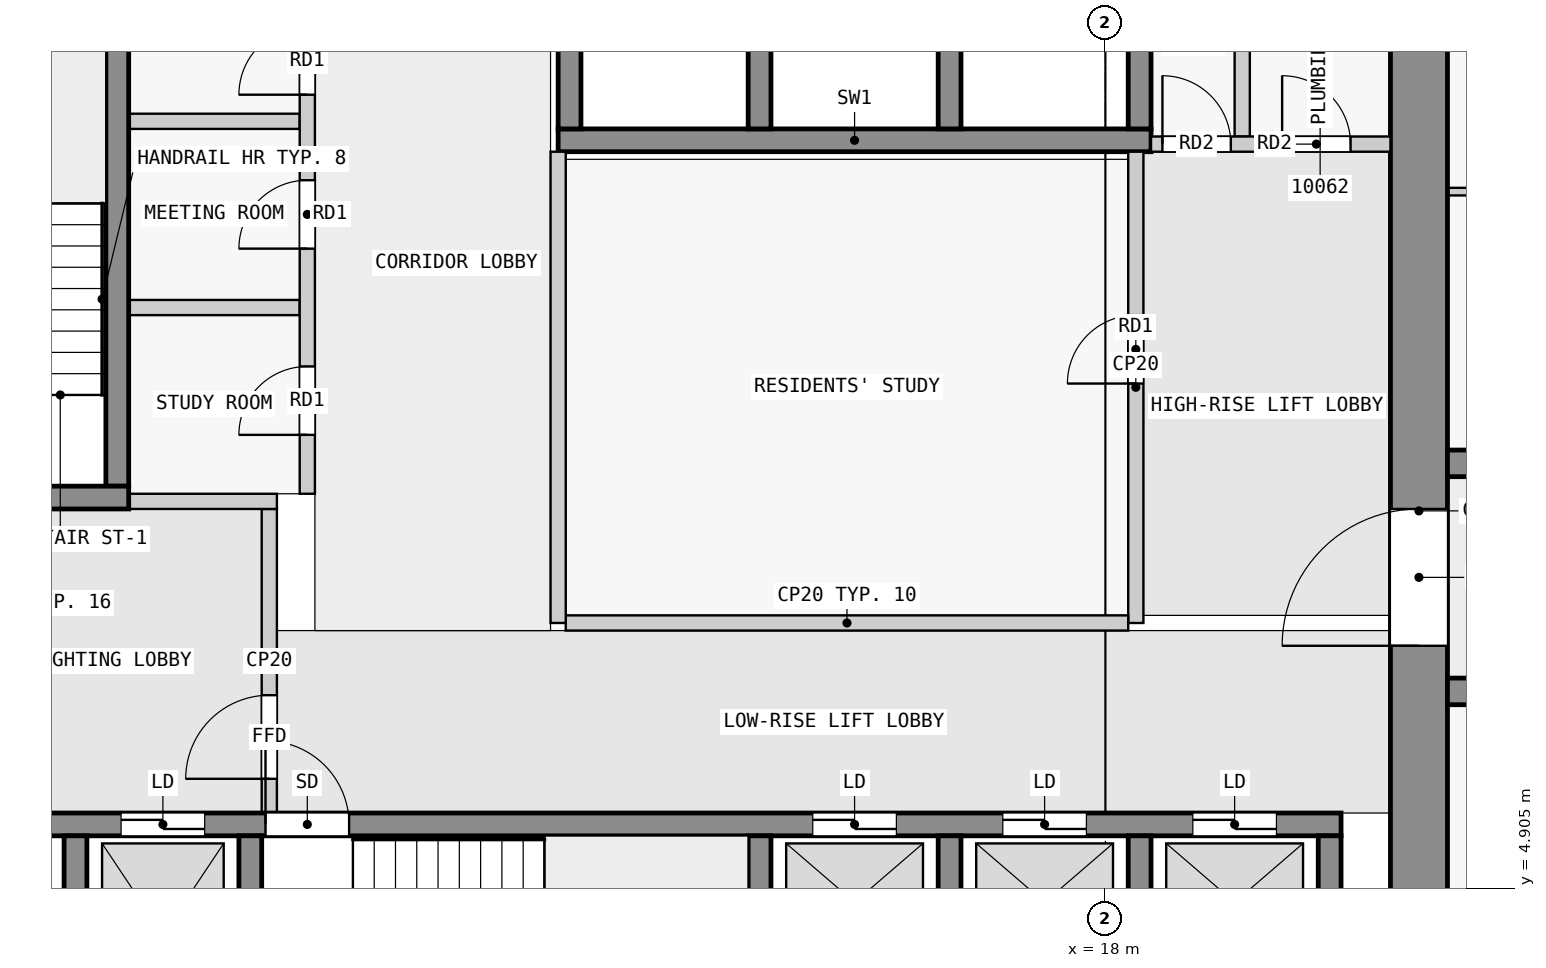
"""IFC4 building model, lengths in metres.
Left out: names, types, materials, properties, quantities, classifications, styles, units other than length and angle.
Written with IfcOpenShell. Run it as: python <this file> out.ifc"""

import sys

from ifc_helpers import new_model, si_unit, direction, frame, frame_2d, origin, place, context, subcontext, project, spatial, rectangle, extrude, element, fill, save


model = new_model("IFC4")
c1 = context("Model", 3, precision=1e-05, world=origin(), true_north=direction((0.0, 1.0)))
c2 = subcontext(c1, "Body", "Model", "MODEL_VIEW")
j1 = project(units=[si_unit("LENGTHUNIT", "METRE"), si_unit("PLANEANGLEUNIT", "RADIAN")], contexts=[c1])
p1 = place(None, origin())
s1 = spatial("IfcSite", under=j1, at=p1, CompositionType="ELEMENT")
p2 = place(p1, origin())
s2 = spatial("IfcBuilding", under=s1, at=p2, CompositionType="ELEMENT")
p3 = place(p2, frame((0.0, 0.0, 44.3)))
s3 = spatial("IfcBuildingStorey", under=s2, at=p3, CompositionType="ELEMENT", Elevation=44.3)
p4 = place(p3, frame((22.125, 2.5, 0.0), z_axis=(0.0, 0.0, 1.0), x_axis=(0.0, 1.0, 0.0)))
e1 = element("IfcWall", 1, at=p4, inside=s3, PredefinedType="SHEAR", context=c2, shape_type="SweptSolid", body=[
    extrude(rectangle(XDim=14.75, YDim=0.75, at=frame_2d((7.375, 0.0))), origin(), (0.0, 0.0, 1.0), 3.25),
])
p5 = place(p4, frame((5.6, 0.0, 0.0)))
e2 = element("IfcOpeningElement", 2, at=p5, cuts=e1, PredefinedType="OPENING", context=c2, shape_type="SweptSolid", body=[
    extrude(rectangle(XDim=1.8, YDim=2.1, at=frame_2d((0.9, 1.05))), frame((0.0, 0.385, 0.0), z_axis=(0.0, -1.0, 0.0), x_axis=(1.0, 0.0, 0.0)), (0.0, 0.0, 1.0), 0.77),
])
for number, where, z_axis, x_axis in (
    (3, (4.45, 2.8, 0.0), (0.0, 0.0, 1.0), (0.0, 1.0, 0.0)),
    (4, (6.75, 2.8, 0.0), (0.0, 0.0, 1.0), (0.0, 1.0, 0.0)),
    (5, (13.45, 2.8, 0.0), (0.0, 0.0, 1.0), (0.0, 1.0, 0.0)),
    (6, (15.95, 2.8, 0.0), (0.0, 0.0, 1.0), (0.0, 1.0, 0.0)),
    (7, (18.45, 2.8, 0.0), (0.0, 0.0, 1.0), (0.0, 1.0, 0.0)),
    (8, (20.95, 2.8, 0.0), (0.0, 0.0, 1.0), (0.0, 1.0, 0.0)),
):
    element("IfcWall", number, at=place(p3, frame(where, z_axis=z_axis, x_axis=x_axis)), inside=s3, PredefinedType="SHEAR", context=c2, shape_type="SweptSolid", body=[
        extrude(rectangle(XDim=2.8, YDim=0.3, at=frame_2d((1.4, 0.0))), origin(), (0.0, 0.0, 1.0), 3.25),
    ])
p6 = place(p3, frame((2.3, 5.75, 0.0), z_axis=(0.0, 0.0, 1.0), x_axis=(1.0, 0.0, 0.0)))
e9 = element("IfcWall", 9, at=p6, inside=s3, PredefinedType="SHEAR", context=c2, shape_type="SweptSolid", body=[
    extrude(rectangle(XDim=18.8, YDim=0.3, at=frame_2d((9.4, 0.0))), origin(), (0.0, 0.0, 1.0), 3.25),
])
p7 = place(p6, frame((4.65, 0.0, 0.0)))
e10 = element("IfcOpeningElement", 10, at=p7, cuts=e9, PredefinedType="OPENING", context=c2, shape_type="SweptSolid", body=[
    extrude(rectangle(XDim=1.1, YDim=2.1, at=frame_2d((0.55, 1.05))), frame((0.0, 0.16, 0.0), z_axis=(0.0, -1.0, 0.0), x_axis=(1.0, 0.0, 0.0)), (0.0, 0.0, 1.0), 0.32),
])
p8 = place(p6, frame((0.45, 0.0, 0.0)))
e11 = element("IfcOpeningElement", 11, at=p8, cuts=e9, PredefinedType="OPENING", context=c2, shape_type="SweptSolid", body=[
    extrude(rectangle(XDim=1.1, YDim=2.1, at=frame_2d((0.55, 1.05))), frame((0.0, 0.16, 0.0), z_axis=(0.0, -1.0, 0.0), x_axis=(1.0, 0.0, 0.0)), (0.0, 0.0, 1.0), 0.32),
])
p9 = place(p6, frame((2.75, 0.0, 0.0)))
e12 = element("IfcOpeningElement", 12, at=p9, cuts=e9, PredefinedType="OPENING", context=c2, shape_type="SweptSolid", body=[
    extrude(rectangle(XDim=1.1, YDim=2.1, at=frame_2d((0.55, 1.05))), frame((0.0, 0.16, 0.0), z_axis=(0.0, -1.0, 0.0), x_axis=(1.0, 0.0, 0.0)), (0.0, 0.0, 1.0), 0.32),
])
p10 = place(p6, frame((11.85, 0.0, 0.0)))
e13 = element("IfcOpeningElement", 13, at=p10, cuts=e9, PredefinedType="OPENING", context=c2, shape_type="SweptSolid", body=[
    extrude(rectangle(XDim=1.1, YDim=2.1, at=frame_2d((0.55, 1.05))), frame((0.0, 0.16, 0.0), z_axis=(0.0, -1.0, 0.0), x_axis=(1.0, 0.0, 0.0)), (0.0, 0.0, 1.0), 0.32),
])
p11 = place(p6, frame((14.35, 0.0, 0.0)))
e14 = element("IfcOpeningElement", 14, at=p11, cuts=e9, PredefinedType="OPENING", context=c2, shape_type="SweptSolid", body=[
    extrude(rectangle(XDim=1.1, YDim=2.1, at=frame_2d((0.55, 1.05))), frame((0.0, 0.16, 0.0), z_axis=(0.0, -1.0, 0.0), x_axis=(1.0, 0.0, 0.0)), (0.0, 0.0, 1.0), 0.32),
])
p12 = place(p6, frame((16.85, 0.0, 0.0)))
e15 = element("IfcOpeningElement", 15, at=p12, cuts=e9, PredefinedType="OPENING", context=c2, shape_type="SweptSolid", body=[
    extrude(rectangle(XDim=1.1, YDim=2.1, at=frame_2d((0.55, 1.05))), frame((0.0, 0.16, 0.0), z_axis=(0.0, -1.0, 0.0), x_axis=(1.0, 0.0, 0.0)), (0.0, 0.0, 1.0), 0.32),
])
p13 = place(p3, frame((2.3, 10.05, 0.0), z_axis=(0.0, 0.0, 1.0), x_axis=(1.0, 0.0, 0.0)))
e16 = element("IfcWall", 16, at=p13, inside=s3, PredefinedType="SHEAR", context=c2, shape_type="SweptSolid", body=[
    extrude(rectangle(XDim=2.85, YDim=0.3, at=frame_2d((1.425, 0.0))), origin(), (0.0, 0.0, 1.0), 3.25),
])
p14 = place(p13, frame((0.25, 0.0, 0.0)))
e17 = element("IfcOpeningElement", 17, at=p14, cuts=e16, PredefinedType="OPENING", context=c2, shape_type="SweptSolid", body=[
    extrude(rectangle(XDim=1.1, YDim=2.1, at=frame_2d((0.55, 1.05))), frame((0.0, 0.16, 0.0), z_axis=(0.0, -1.0, 0.0), x_axis=(1.0, 0.0, 0.0)), (0.0, 0.0, 1.0), 0.32),
])
p15 = place(p3, frame((5.0, 10.2, 0.0), z_axis=(0.0, 0.0, 1.0), x_axis=(0.0, 1.0, 0.0)))
e18 = element("IfcWall", 18, at=p15, inside=s3, PredefinedType="SHEAR", context=c2, shape_type="SweptSolid", body=[
    extrude(rectangle(XDim=6.4, YDim=0.3, at=frame_2d((3.2, 0.0))), origin(), (0.0, 0.0, 1.0), 3.25),
])
p16 = place(p3, frame((10.8, 14.75, 0.0), z_axis=(0.0, 0.0, 1.0), x_axis=(1.0, 0.0, 0.0)))
e19 = element("IfcWall", 19, at=p16, inside=s3, PredefinedType="SHEAR", context=c2, shape_type="SweptSolid", body=[
    extrude(rectangle(XDim=7.8, YDim=0.3, at=frame_2d((3.9, 0.0))), origin(), (0.0, 0.0, 1.0), 3.25),
])
for number, where, z_axis, x_axis in (
    (20, (10.95, 14.9, 0.0), (0.0, 0.0, 1.0), (0.0, 1.0, 0.0)),
    (21, (13.45, 14.9, 0.0), (0.0, 0.0, 1.0), (0.0, 1.0, 0.0)),
    (22, (15.95, 14.9, 0.0), (0.0, 0.0, 1.0), (0.0, 1.0, 0.0)),
    (23, (18.45, 14.9, 0.0), (0.0, 0.0, 1.0), (0.0, 1.0, 0.0)),
):
    element("IfcWall", number, at=place(p3, frame(where, z_axis=z_axis, x_axis=x_axis)), inside=s3, PredefinedType="SHEAR", context=c2, shape_type="SweptSolid", body=[
        extrude(rectangle(XDim=2.0, YDim=0.3, at=frame_2d((1.0, 0.0))), origin(), (0.0, 0.0, 1.0), 3.25),
    ])
p17 = place(p3, frame((22.5, 7.5, 0.0), z_axis=(0.0, 0.0, 1.0), x_axis=(1.0, 0.0, 0.0)))
e24 = element("IfcWall", 24, at=p17, inside=s3, PredefinedType="SHEAR", context=c2, shape_type="SweptSolid", body=[
    extrude(rectangle(XDim=22.5, YDim=0.35, at=frame_2d((11.25, 0.0))), origin(), (0.0, 0.0, 1.0), 3.25),
])
p18 = place(p17, frame((1.75, 0.0, 0.0)))
e25 = element("IfcOpeningElement", 25, at=p18, cuts=e24, PredefinedType="OPENING", context=c2, shape_type="SweptSolid", body=[
    extrude(rectangle(XDim=1.0, YDim=2.1, at=frame_2d((0.5, 1.05))), frame((0.0, 0.185, 0.0), z_axis=(0.0, -1.0, 0.0), x_axis=(1.0, 0.0, 0.0)), (0.0, 0.0, 1.0), 0.37),
])
p19 = place(p17, frame((10.15, 0.0, 0.0)))
e26 = element("IfcOpeningElement", 26, at=p19, cuts=e24, PredefinedType="OPENING", context=c2, shape_type="SweptSolid", body=[
    extrude(rectangle(XDim=1.0, YDim=2.1, at=frame_2d((0.5, 1.05))), frame((0.0, 0.185, 0.0), z_axis=(0.0, -1.0, 0.0), x_axis=(1.0, 0.0, 0.0)), (0.0, 0.0, 1.0), 0.37),
])
p20 = place(p17, frame((18.75, 0.0, 0.0)))
e27 = element("IfcOpeningElement", 27, at=p20, cuts=e24, PredefinedType="OPENING", context=c2, shape_type="SweptSolid", body=[
    extrude(rectangle(XDim=0.9, YDim=2.1, at=frame_2d((0.45, 1.05))), frame((0.0, 0.185, 0.0), z_axis=(0.0, -1.0, 0.0), x_axis=(1.0, 0.0, 0.0)), (0.0, 0.0, 1.0), 0.37),
])
p21 = place(p17, frame((20.95, 0.0, 0.0)))
e28 = element("IfcOpeningElement", 28, at=p21, cuts=e24, PredefinedType="OPENING", context=c2, shape_type="SweptSolid", body=[
    extrude(rectangle(XDim=1.0, YDim=2.1, at=frame_2d((0.5, 1.05))), frame((0.0, 0.185, 0.0), z_axis=(0.0, -1.0, 0.0), x_axis=(1.0, 0.0, 0.0)), (0.0, 0.0, 1.0), 0.37),
])
p22 = place(p3, frame((22.5, 10.5, 0.0), z_axis=(0.0, 0.0, 1.0), x_axis=(1.0, 0.0, 0.0)))
e29 = element("IfcWall", 29, at=p22, inside=s3, PredefinedType="SHEAR", context=c2, shape_type="SweptSolid", body=[
    extrude(rectangle(XDim=22.5, YDim=0.35, at=frame_2d((11.25, 0.0))), origin(), (0.0, 0.0, 1.0), 3.25),
])
p23 = place(p22, frame((1.75, 0.0, 0.0)))
e30 = element("IfcOpeningElement", 30, at=p23, cuts=e29, PredefinedType="OPENING", context=c2, shape_type="SweptSolid", body=[
    extrude(rectangle(XDim=1.0, YDim=2.1, at=frame_2d((0.5, 1.05))), frame((0.0, 0.185, 0.0), z_axis=(0.0, -1.0, 0.0), x_axis=(1.0, 0.0, 0.0)), (0.0, 0.0, 1.0), 0.37),
])
p24 = place(p22, frame((6.25, 0.0, 0.0)))
e31 = element("IfcOpeningElement", 31, at=p24, cuts=e29, PredefinedType="OPENING", context=c2, shape_type="SweptSolid", body=[
    extrude(rectangle(XDim=1.0, YDim=2.1, at=frame_2d((0.5, 1.05))), frame((0.0, 0.185, 0.0), z_axis=(0.0, -1.0, 0.0), x_axis=(1.0, 0.0, 0.0)), (0.0, 0.0, 1.0), 0.37),
])
p25 = place(p22, frame((10.75, 0.0, 0.0)))
e32 = element("IfcOpeningElement", 32, at=p25, cuts=e29, PredefinedType="OPENING", context=c2, shape_type="SweptSolid", body=[
    extrude(rectangle(XDim=1.0, YDim=2.1, at=frame_2d((0.5, 1.05))), frame((0.0, 0.185, 0.0), z_axis=(0.0, -1.0, 0.0), x_axis=(1.0, 0.0, 0.0)), (0.0, 0.0, 1.0), 0.37),
])
p26 = place(p22, frame((16.85, 0.0, 0.0)))
e33 = element("IfcOpeningElement", 33, at=p26, cuts=e29, PredefinedType="OPENING", context=c2, shape_type="SweptSolid", body=[
    extrude(rectangle(XDim=1.0, YDim=2.1, at=frame_2d((0.5, 1.05))), frame((0.0, 0.185, 0.0), z_axis=(0.0, -1.0, 0.0), x_axis=(1.0, 0.0, 0.0)), (0.0, 0.0, 1.0), 0.37),
])
p27 = place(p3, frame((7.0, 5.9, 0.0), z_axis=(0.0, 0.0, 1.0), x_axis=(0.0, 1.0, 0.0)))
e34 = element("IfcWall", 34, at=p27, inside=s3, PredefinedType="PARTITIONING", context=c2, shape_type="SweptSolid", body=[
    extrude(rectangle(XDim=4.0, YDim=0.2, at=frame_2d((2.0, 0.0))), origin(), (0.0, 0.0, 1.0), 3.25),
])
p28 = place(p27, frame((0.45, 0.0, 0.0)))
e35 = element("IfcOpeningElement", 35, at=p28, cuts=e34, PredefinedType="OPENING", context=c2, shape_type="SweptSolid", body=[
    extrude(rectangle(XDim=1.1, YDim=2.1, at=frame_2d((0.55, 1.05))), frame((0.0, 0.11, 0.0), z_axis=(0.0, -1.0, 0.0), x_axis=(1.0, 0.0, 0.0)), (0.0, 0.0, 1.0), 0.22),
])
p29 = place(p3, frame((5.15, 10.0, 0.0), z_axis=(0.0, 0.0, 1.0), x_axis=(1.0, 0.0, 0.0)))
e36 = element("IfcWall", 36, at=p29, inside=s3, PredefinedType="PARTITIONING", context=c2, shape_type="SweptSolid", body=[
    extrude(rectangle(XDim=1.95, YDim=0.2, at=frame_2d((0.975, 0.0))), origin(), (0.0, 0.0, 1.0), 3.25),
])
p30 = place(p3, frame((10.8, 8.4, 0.0), z_axis=(0.0, 0.0, 1.0), x_axis=(0.0, 1.0, 0.0)))
e37 = element("IfcWall", 37, at=p30, inside=s3, PredefinedType="PARTITIONING", context=c2, shape_type="SweptSolid", body=[
    extrude(rectangle(XDim=6.2, YDim=0.2, at=frame_2d((3.1, 0.0))), origin(), (0.0, 0.0, 1.0), 3.25),
])
p31 = place(p3, frame((10.9, 8.4, 0.0), z_axis=(0.0, 0.0, 1.0), x_axis=(1.0, 0.0, 0.0)))
e38 = element("IfcWall", 38, at=p31, inside=s3, PredefinedType="PARTITIONING", context=c2, shape_type="SweptSolid", body=[
    extrude(rectangle(XDim=7.4, YDim=0.2, at=frame_2d((3.7, 0.0))), origin(), (0.0, 0.0, 1.0), 3.25),
])
p32 = place(p3, frame((18.4, 8.4, 0.0), z_axis=(0.0, 0.0, 1.0), x_axis=(0.0, 1.0, 0.0)))
e39 = element("IfcWall", 39, at=p32, inside=s3, PredefinedType="PARTITIONING", context=c2, shape_type="SweptSolid", body=[
    extrude(rectangle(XDim=6.2, YDim=0.2, at=frame_2d((3.1, 0.0))), origin(), (0.0, 0.0, 1.0), 3.25),
])
p33 = place(p32, frame((3.15, 0.0, 0.0)))
e40 = element("IfcOpeningElement", 40, at=p33, cuts=e39, PredefinedType="OPENING", context=c2, shape_type="SweptSolid", body=[
    extrude(rectangle(XDim=0.9, YDim=2.1, at=frame_2d((0.45, 1.05))), frame((0.0, 0.11, 0.0), z_axis=(0.0, -1.0, 0.0), x_axis=(1.0, 0.0, 0.0)), (0.0, 0.0, 1.0), 0.22),
])
p34 = place(p3, frame((7.5, 10.1, 0.0), z_axis=(0.0, 0.0, 1.0), x_axis=(0.0, 1.0, 0.0)))
e41 = element("IfcWall", 41, at=p34, inside=s3, PredefinedType="PARTITIONING", context=c2, shape_type="SweptSolid", body=[
    extrude(rectangle(XDim=7.15, YDim=0.2, at=frame_2d((3.575, 0.0))), origin(), (0.0, 0.0, 1.0), 3.25),
])
p35 = place(p34, frame((0.775, 0.0, 0.0)))
e42 = element("IfcOpeningElement", 42, at=p35, cuts=e41, PredefinedType="OPENING", context=c2, shape_type="SweptSolid", body=[
    extrude(rectangle(XDim=0.9, YDim=2.1, at=frame_2d((0.45, 1.05))), frame((0.0, 0.11, 0.0), z_axis=(0.0, -1.0, 0.0), x_axis=(1.0, 0.0, 0.0)), (0.0, 0.0, 1.0), 0.22),
])
p36 = place(p34, frame((3.225, 0.0, 0.0)))
e43 = element("IfcOpeningElement", 43, at=p36, cuts=e41, PredefinedType="OPENING", context=c2, shape_type="SweptSolid", body=[
    extrude(rectangle(XDim=0.9, YDim=2.1, at=frame_2d((0.45, 1.05))), frame((0.0, 0.11, 0.0), z_axis=(0.0, -1.0, 0.0), x_axis=(1.0, 0.0, 0.0)), (0.0, 0.0, 1.0), 0.22),
])
p37 = place(p34, frame((5.25, 0.0, 0.0)))
e44 = element("IfcOpeningElement", 44, at=p37, cuts=e41, PredefinedType="OPENING", context=c2, shape_type="SweptSolid", body=[
    extrude(rectangle(XDim=0.9, YDim=2.1, at=frame_2d((0.45, 1.05))), frame((0.0, 0.11, 0.0), z_axis=(0.0, -1.0, 0.0), x_axis=(1.0, 0.0, 0.0)), (0.0, 0.0, 1.0), 0.22),
])
for number, where, z_axis, x_axis in (
    (45, (5.15, 12.55, 0.0), (0.0, 0.0, 1.0), (1.0, 0.0, 0.0)),
    (46, (5.15, 15.0, 0.0), (0.0, 0.0, 1.0), (1.0, 0.0, 0.0)),
):
    element("IfcWall", number, at=place(p3, frame(where, z_axis=z_axis, x_axis=x_axis)), inside=s3, PredefinedType="PARTITIONING", context=c2, shape_type="SweptSolid", body=[
        extrude(rectangle(XDim=2.25, YDim=0.2, at=frame_2d((1.125, 0.0))), origin(), (0.0, 0.0, 1.0), 3.25),
    ])
p38 = place(p3, frame((18.6, 14.7, 0.0), z_axis=(0.0, 0.0, 1.0), x_axis=(1.0, 0.0, 0.0)))
e47 = element("IfcWall", 47, at=p38, inside=s3, PredefinedType="PARTITIONING", context=c2, shape_type="SweptSolid", body=[
    extrude(rectangle(XDim=3.15, YDim=0.2, at=frame_2d((1.575, 0.0))), origin(), (0.0, 0.0, 1.0), 3.25),
])
p39 = place(p38, frame((0.15, 0.0, 0.0)))
e48 = element("IfcOpeningElement", 48, at=p39, cuts=e47, PredefinedType="OPENING", context=c2, shape_type="SweptSolid", body=[
    extrude(rectangle(XDim=0.9, YDim=2.1, at=frame_2d((0.45, 1.05))), frame((0.0, 0.11, 0.0), z_axis=(0.0, -1.0, 0.0), x_axis=(1.0, 0.0, 0.0)), (0.0, 0.0, 1.0), 0.22),
])
p40 = place(p38, frame((1.725, 0.0, 0.0)))
e49 = element("IfcOpeningElement", 49, at=p40, cuts=e47, PredefinedType="OPENING", context=c2, shape_type="SweptSolid", body=[
    extrude(rectangle(XDim=0.9, YDim=2.1, at=frame_2d((0.45, 1.05))), frame((0.0, 0.11, 0.0), z_axis=(0.0, -1.0, 0.0), x_axis=(1.0, 0.0, 0.0)), (0.0, 0.0, 1.0), 0.22),
])
p41 = place(p3, frame((19.8, 14.8, 0.0), z_axis=(0.0, 0.0, 1.0), x_axis=(0.0, 1.0, 0.0)))
e50 = element("IfcWall", 50, at=p41, inside=s3, PredefinedType="PARTITIONING", context=c2, shape_type="SweptSolid", body=[
    extrude(rectangle(XDim=2.45, YDim=0.2, at=frame_2d((1.225, 0.0))), origin(), (0.0, 0.0, 1.0), 3.25),
])
p42 = place(p3, frame((23.95, 14.075, 0.0), z_axis=(0.0, 0.0, 1.0), x_axis=(-1.0, 0.0, 0.0)))
e51 = element("IfcWall", 51, at=p42, inside=s3, PredefinedType="PARTITIONING", context=c2, shape_type="SweptSolid", body=[
    extrude(rectangle(XDim=1.45, YDim=0.1, at=frame_2d((0.725, 0.0))), origin(), (0.0, 0.0, 1.0), 3.25),
])
p43 = place(p28, origin())
e52 = element("IfcDoor", 52, at=p43, inside=s3, OperationType="SINGLE_SWING_LEFT", PredefinedType="DOOR", context=c2, shape_type="SweptSolid", body=[
    extrude(rectangle(XDim=1.1, YDim=2.1, at=frame_2d((0.55, 1.05))), frame((0.0, 0.025, 0.0), z_axis=(0.0, -1.0, 0.0), x_axis=(1.0, 0.0, 0.0)), (0.0, 0.0, 1.0), 0.05),
])
fill(e35, e52)
p44 = place(p33, origin())
e53 = element("IfcDoor", 53, at=p44, inside=s3, OperationType="SINGLE_SWING_LEFT", PredefinedType="DOOR", context=c2, shape_type="SweptSolid", body=[
    extrude(rectangle(XDim=0.9, YDim=2.1, at=frame_2d((0.45, 1.05))), frame((0.0, 0.025, 0.0), z_axis=(0.0, -1.0, 0.0), x_axis=(1.0, 0.0, 0.0)), (0.0, 0.0, 1.0), 0.05),
])
fill(e40, e53)
p45 = place(p7, origin())
e54 = element("IfcDoor", 54, at=p45, inside=s3, OperationType="SINGLE_SWING_LEFT", PredefinedType="DOOR", context=c2, shape_type="SweptSolid", body=[
    extrude(rectangle(XDim=1.1, YDim=2.1, at=frame_2d((0.55, 1.05))), frame((0.0, 0.025, 0.0), z_axis=(0.0, -1.0, 0.0), x_axis=(1.0, 0.0, 0.0)), (0.0, 0.0, 1.0), 0.05),
])
fill(e10, e54)
p46 = place(p9, origin())
e55 = element("IfcDoor", 55, at=p46, inside=s3, OperationType="DOUBLE_DOOR_SLIDING", PredefinedType="DOOR", context=c2, shape_type="SweptSolid", body=[
    extrude(rectangle(XDim=1.1, YDim=2.1, at=frame_2d((0.55, 1.05))), frame((0.0, 0.025, 0.0), z_axis=(0.0, -1.0, 0.0), x_axis=(1.0, 0.0, 0.0)), (0.0, 0.0, 1.0), 0.05),
])
fill(e12, e55)
p47 = place(p10, origin())
e56 = element("IfcDoor", 56, at=p47, inside=s3, OperationType="DOUBLE_DOOR_SLIDING", PredefinedType="DOOR", context=c2, shape_type="SweptSolid", body=[
    extrude(rectangle(XDim=1.1, YDim=2.1, at=frame_2d((0.55, 1.05))), frame((0.0, 0.025, 0.0), z_axis=(0.0, -1.0, 0.0), x_axis=(1.0, 0.0, 0.0)), (0.0, 0.0, 1.0), 0.05),
])
fill(e13, e56)
p48 = place(p11, origin())
e57 = element("IfcDoor", 57, at=p48, inside=s3, OperationType="DOUBLE_DOOR_SLIDING", PredefinedType="DOOR", context=c2, shape_type="SweptSolid", body=[
    extrude(rectangle(XDim=1.1, YDim=2.1, at=frame_2d((0.55, 1.05))), frame((0.0, 0.025, 0.0), z_axis=(0.0, -1.0, 0.0), x_axis=(1.0, 0.0, 0.0)), (0.0, 0.0, 1.0), 0.05),
])
fill(e14, e57)
p49 = place(p12, origin())
e58 = element("IfcDoor", 58, at=p49, inside=s3, OperationType="DOUBLE_DOOR_SLIDING", PredefinedType="DOOR", context=c2, shape_type="SweptSolid", body=[
    extrude(rectangle(XDim=1.1, YDim=2.1, at=frame_2d((0.55, 1.05))), frame((0.0, 0.025, 0.0), z_axis=(0.0, -1.0, 0.0), x_axis=(1.0, 0.0, 0.0)), (0.0, 0.0, 1.0), 0.05),
])
fill(e15, e58)
p50 = place(p5, origin())
e59 = element("IfcDoor", 59, at=p50, inside=s3, OperationType="DOUBLE_DOOR_SINGLE_SWING", PredefinedType="DOOR", context=c2, shape_type="SweptSolid", body=[
    extrude(rectangle(XDim=1.8, YDim=2.1, at=frame_2d((0.9, 1.05))), frame((0.0, 0.025, 0.0), z_axis=(0.0, -1.0, 0.0), x_axis=(1.0, 0.0, 0.0)), (0.0, 0.0, 1.0), 0.05),
])
fill(e2, e59)
p51 = place(p35, origin())
e60 = element("IfcDoor", 60, at=p51, inside=s3, OperationType="SINGLE_SWING_RIGHT", PredefinedType="DOOR", context=c2, shape_type="SweptSolid", body=[
    extrude(rectangle(XDim=0.9, YDim=2.1, at=frame_2d((0.45, 1.05))), frame((0.0, 0.025, 0.0), z_axis=(0.0, -1.0, 0.0), x_axis=(1.0, 0.0, 0.0)), (0.0, 0.0, 1.0), 0.05),
])
fill(e42, e60)
p52 = place(p36, origin())
e61 = element("IfcDoor", 61, at=p52, inside=s3, OperationType="SINGLE_SWING_RIGHT", PredefinedType="DOOR", context=c2, shape_type="SweptSolid", body=[
    extrude(rectangle(XDim=0.9, YDim=2.1, at=frame_2d((0.45, 1.05))), frame((0.0, 0.025, 0.0), z_axis=(0.0, -1.0, 0.0), x_axis=(1.0, 0.0, 0.0)), (0.0, 0.0, 1.0), 0.05),
])
fill(e43, e61)
p53 = place(p37, origin())
e62 = element("IfcDoor", 62, at=p53, inside=s3, OperationType="SINGLE_SWING_RIGHT", PredefinedType="DOOR", context=c2, shape_type="SweptSolid", body=[
    extrude(rectangle(XDim=0.9, YDim=2.1, at=frame_2d((0.45, 1.05))), frame((0.0, 0.025, 0.0), z_axis=(0.0, -1.0, 0.0), x_axis=(1.0, 0.0, 0.0)), (0.0, 0.0, 1.0), 0.05),
])
fill(e44, e62)
p54 = place(p39, origin())
e63 = element("IfcDoor", 63, at=p54, inside=s3, OperationType="SINGLE_SWING_LEFT", PredefinedType="DOOR", context=c2, shape_type="SweptSolid", body=[
    extrude(rectangle(XDim=0.9, YDim=2.1, at=frame_2d((0.45, 1.05))), frame((0.0, 0.025, 0.0), z_axis=(0.0, -1.0, 0.0), x_axis=(1.0, 0.0, 0.0)), (0.0, 0.0, 1.0), 0.05),
])
fill(e48, e63)
p55 = place(p40, origin())
e64 = element("IfcDoor", 64, at=p55, inside=s3, OperationType="SINGLE_SWING_LEFT", PredefinedType="DOOR", context=c2, shape_type="SweptSolid", body=[
    extrude(rectangle(XDim=0.9, YDim=2.1, at=frame_2d((0.45, 1.05))), frame((0.0, 0.025, 0.0), z_axis=(0.0, -1.0, 0.0), x_axis=(1.0, 0.0, 0.0)), (0.0, 0.0, 1.0), 0.05),
])
fill(e49, e64)
save(model, sys.argv[1])
